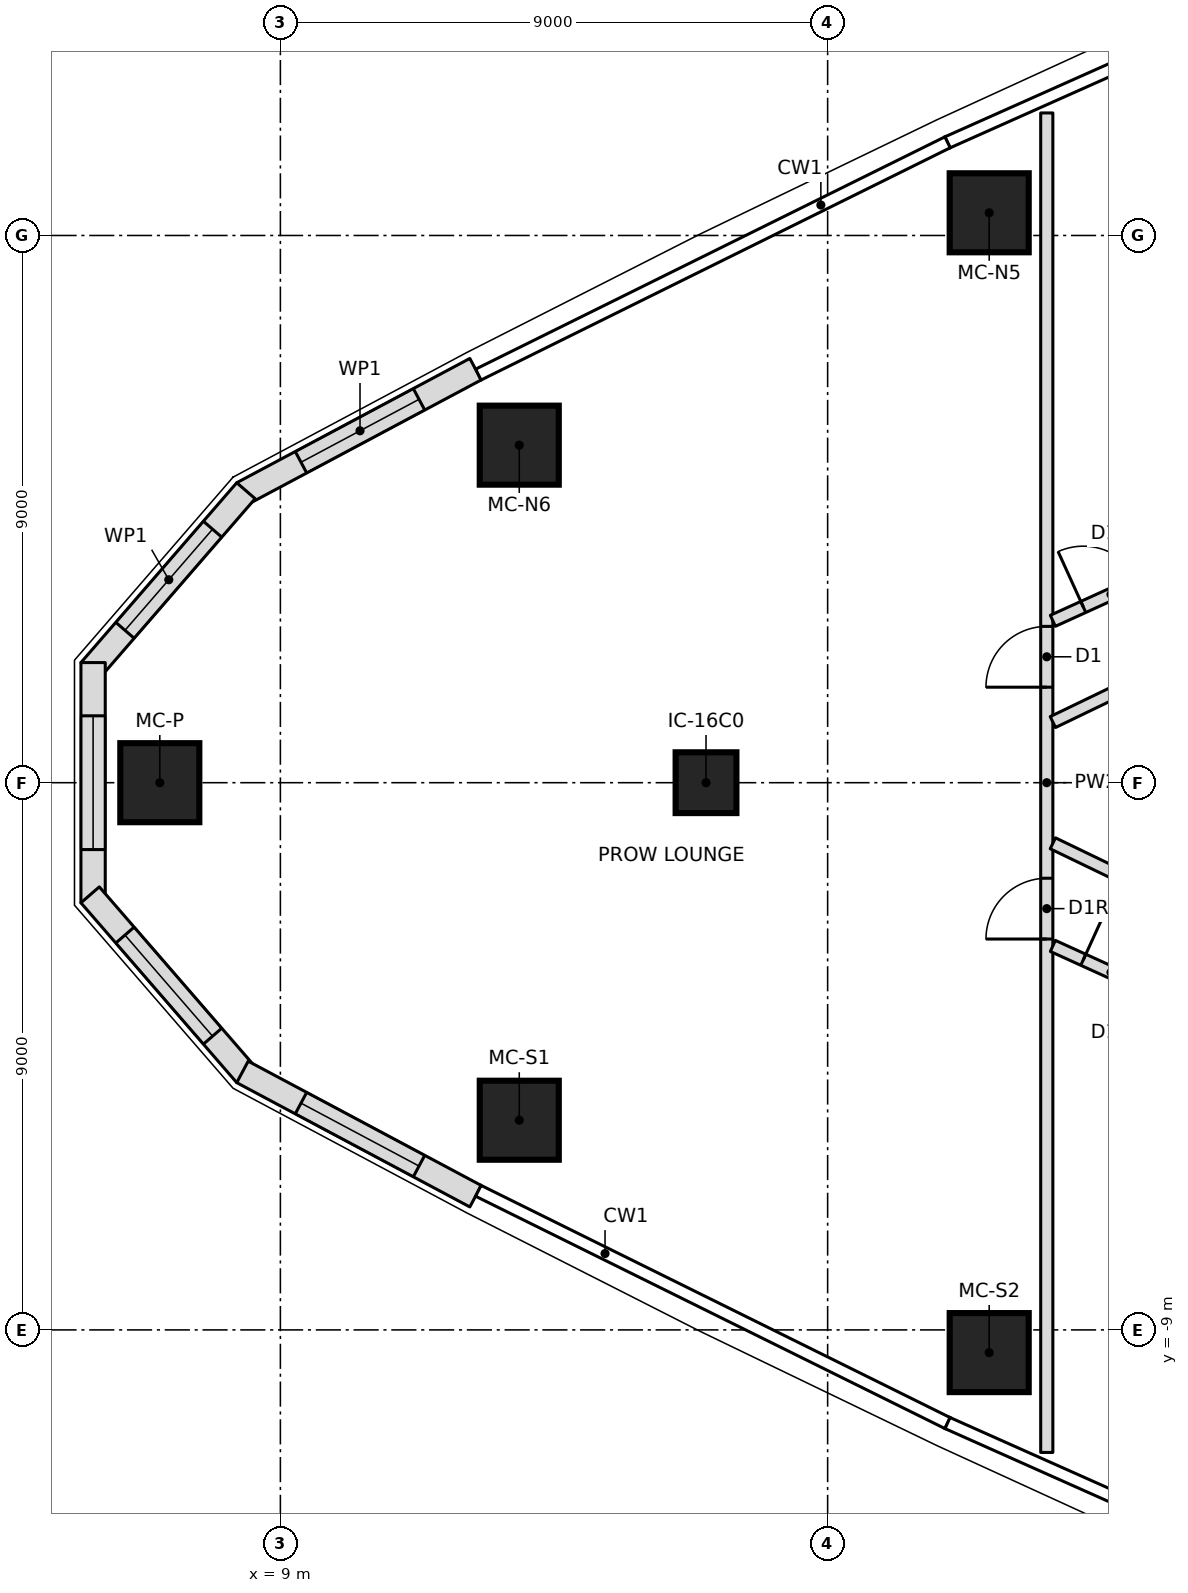
"""IFC4 building model, lengths in metres.
Left out: names, types, materials, properties, quantities, classifications, styles, units other than length and angle.
Written with IfcOpenShell. Run it as: python <this file> out.ifc"""

import sys

from ifc_helpers import new_model, si_unit, direction, frame, frame_2d, origin, origin_2d, place, context, subcontext, project, spatial, polyline, rectangle, outline, extrude, element, fill, save


model = new_model("IFC4")
c1 = context("Model", 3, precision=1e-05, world=origin(), true_north=direction((0.0, 1.0)))
c2 = subcontext(c1, "Body", "Model", "MODEL_VIEW")
j1 = project(units=[si_unit("LENGTHUNIT", "METRE"), si_unit("PLANEANGLEUNIT", "RADIAN")], contexts=[c1])
p1 = place(None, origin())
s1 = spatial("IfcSite", under=j1, at=p1, CompositionType="ELEMENT")
p2 = place(p1, origin())
s2 = spatial("IfcBuilding", under=s1, at=p2, CompositionType="ELEMENT")
p3 = place(p2, frame((0.0, 0.0, 196.8)))
s3 = spatial("IfcBuildingStorey", under=s2, at=p3, CompositionType="ELEMENT", Elevation=196.8)
for number, where, z_axis, x_axis in (
    (1, (7.017, 0.0, 0.0), (0.0, 0.0, 1.0), (1.0, 0.0, 0.0)),
    (2, (12.929, -5.552, 0.0), (0.0, 0.0, 1.0), (1.0, 0.0, 0.0)),
    (3, (20.657, -9.373, 0.0), (0.0, 0.0, 1.0), (1.0, 0.0, 0.0)),
    (4, (20.657, 9.373, 0.0), (0.0, 0.0, 1.0), (1.0, 0.0, 0.0)),
    (5, (12.929, 5.552, 0.0), (0.0, 0.0, 1.0), (1.0, 0.0, 0.0)),
):
    element("IfcColumn", number, at=place(p3, frame(where, z_axis=z_axis, x_axis=x_axis)), inside=s3, PredefinedType="COLUMN", context=c2, shape_type="SweptSolid", body=[
        extrude(rectangle(XDim=1.3, YDim=1.3, at=origin_2d()), origin(), (0.0, 0.0, 1.0), 3.55),
    ])
p4 = place(p3, frame((16.0, 0.0, 0.0), z_axis=(0.0, 0.0, 1.0), x_axis=(1.0, 0.0, 0.0)))
e6 = element("IfcColumn", 6, at=p4, inside=s3, PredefinedType="COLUMN", context=c2, shape_type="SweptSolid", body=[
    extrude(rectangle(XDim=1.0, YDim=1.0, at=origin_2d()), origin(), (0.0, 0.0, 1.0), 3.55),
])
p5 = place(p3, frame((12.21, 6.801, 0.0), z_axis=(0.0, 0.0, 1.0), x_axis=(-0.882385889746, -0.470526451518, 0.0)))
e7 = element("IfcWall", 7, at=p5, inside=s3, PredefinedType="NOTDEFINED", context=c2, shape_type="SweptSolid", body=[
    extrude(outline(polyline([(0.0, -0.2), (4.344, -0.2), (4.27, 0.2), (0.0, 0.2), (0.0, -0.2)])), origin(), (0.0, 0.0, 1.0), 3.25),
])
p6 = place(p5, frame((1.053, 0.0, 0.6)))
e8 = element("IfcOpeningElement", 8, at=p6, cuts=e7, PredefinedType="OPENING", context=c2, shape_type="SweptSolid", body=[
    extrude(outline(polyline([(0.0, 1.35), (0.084, 1.771), (0.322, 2.128), (0.679, 2.366), (1.1, 2.45), (1.521, 2.366), (1.878, 2.128), (2.116, 1.771), (2.2, 1.35), (2.2, 1.1), (2.116, 0.679), (1.878, 0.322), (1.521, 0.084), (1.1, 0.0), (0.679, 0.084), (0.322, 0.322), (0.084, 0.679), (0.0, 1.1), (0.0, 1.35)])), frame((0.0, 0.21, 0.0), z_axis=(0.0, -1.0, 0.0), x_axis=(1.0, 0.0, 0.0)), (0.0, 0.0, 1.0), 0.42),
])
p7 = place(p3, frame((8.409, 4.774, 0.0), z_axis=(0.0, 0.0, 1.0), x_axis=(-0.654759384203, -0.755837382509, 0.0)))
e9 = element("IfcWall", 9, at=p7, inside=s3, PredefinedType="NOTDEFINED", context=c2, shape_type="SweptSolid", body=[
    extrude(outline(polyline([(-0.037, -0.2), (3.876, -0.2), (3.727, 0.2), (0.037, 0.2), (-0.037, -0.2)])), origin(), (0.0, 0.0, 1.0), 3.25),
])
p8 = place(p7, frame((0.801, 0.0, 0.6)))
e10 = element("IfcOpeningElement", 10, at=p8, cuts=e9, PredefinedType="OPENING", context=c2, shape_type="SweptSolid", body=[
    extrude(outline(polyline([(0.0, 1.35), (0.084, 1.771), (0.322, 2.128), (0.679, 2.366), (1.1, 2.45), (1.521, 2.366), (1.878, 2.128), (2.116, 1.771), (2.2, 1.35), (2.2, 1.1), (2.116, 0.679), (1.878, 0.322), (1.521, 0.084), (1.1, 0.0), (0.679, 0.084), (0.322, 0.322), (0.084, 0.679), (0.0, 1.1), (0.0, 1.35)])), frame((0.0, 0.21, 0.0), z_axis=(0.0, -1.0, 0.0), x_axis=(1.0, 0.0, 0.0)), (0.0, 0.0, 1.0), 0.42),
])
p9 = place(p3, frame((5.92, 1.901, 0.0), z_axis=(0.0, 0.0, 1.0), x_axis=(0.0, -1.0, 0.0)))
e11 = element("IfcWall", 11, at=p9, inside=s3, PredefinedType="NOTDEFINED", context=c2, shape_type="SweptSolid", body=[
    extrude(outline(polyline([(-0.075, -0.2), (3.876, -0.2), (3.727, 0.2), (0.075, 0.2), (-0.075, -0.2)])), origin(), (0.0, 0.0, 1.0), 3.25),
])
p10 = place(p9, frame((0.801, 0.0, 0.6)))
e12 = element("IfcOpeningElement", 12, at=p10, cuts=e11, PredefinedType="OPENING", context=c2, shape_type="SweptSolid", body=[
    extrude(outline(polyline([(0.0, 1.35), (0.084, 1.771), (0.322, 2.128), (0.679, 2.366), (1.1, 2.45), (1.521, 2.366), (1.878, 2.128), (2.116, 1.771), (2.2, 1.35), (2.2, 1.1), (2.116, 0.679), (1.878, 0.322), (1.521, 0.084), (1.1, 0.0), (0.679, 0.084), (0.322, 0.322), (0.084, 0.679), (0.0, 1.1), (0.0, 1.35)])), frame((0.0, 0.21, 0.0), z_axis=(0.0, -1.0, 0.0), x_axis=(1.0, 0.0, 0.0)), (0.0, 0.0, 1.0), 0.42),
])
p11 = place(p3, frame((5.92, -1.901, 0.0), z_axis=(0.0, 0.0, 1.0), x_axis=(0.654759384203, -0.755837382509, 0.0)))
e13 = element("IfcWall", 13, at=p11, inside=s3, PredefinedType="NOTDEFINED", context=c2, shape_type="SweptSolid", body=[
    extrude(outline(polyline([(-0.075, -0.2), (3.839, -0.2), (3.765, 0.2), (0.075, 0.2), (-0.075, -0.2)])), origin(), (0.0, 0.0, 1.0), 3.25),
])
p12 = place(p11, frame((0.801, 0.0, 0.6)))
e14 = element("IfcOpeningElement", 14, at=p12, cuts=e13, PredefinedType="OPENING", context=c2, shape_type="SweptSolid", body=[
    extrude(outline(polyline([(0.0, 1.35), (0.084, 1.771), (0.322, 2.128), (0.679, 2.366), (1.1, 2.45), (1.521, 2.366), (1.878, 2.128), (2.116, 1.771), (2.2, 1.35), (2.2, 1.1), (2.116, 0.679), (1.878, 0.322), (1.521, 0.084), (1.1, 0.0), (0.679, 0.084), (0.322, 0.322), (0.084, 0.679), (0.0, 1.1), (0.0, 1.35)])), frame((0.0, 0.21, 0.0), z_axis=(0.0, -1.0, 0.0), x_axis=(1.0, 0.0, 0.0)), (0.0, 0.0, 1.0), 0.42),
])
p13 = place(p3, frame((8.409, -4.774, 0.0), z_axis=(0.0, 0.0, 1.0), x_axis=(0.882385889746, -0.470526451518, 0.0)))
e15 = element("IfcWall", 15, at=p13, inside=s3, PredefinedType="NOTDEFINED", context=c2, shape_type="SweptSolid", body=[
    extrude(outline(polyline([(-0.037, -0.2), (4.307, -0.2), (4.307, 0.2), (0.037, 0.2), (-0.037, -0.2)])), origin(), (0.0, 0.0, 1.0), 3.25),
])
p14 = place(p13, frame((1.053, 0.0, 0.6)))
e16 = element("IfcOpeningElement", 16, at=p14, cuts=e15, PredefinedType="OPENING", context=c2, shape_type="SweptSolid", body=[
    extrude(outline(polyline([(0.0, 1.35), (0.084, 1.771), (0.322, 2.128), (0.679, 2.366), (1.1, 2.45), (1.521, 2.366), (1.878, 2.128), (2.116, 1.771), (2.2, 1.35), (2.2, 1.1), (2.116, 0.679), (1.878, 0.322), (1.521, 0.084), (1.1, 0.0), (0.679, 0.084), (0.322, 0.322), (0.084, 0.679), (0.0, 1.1), (0.0, 1.35)])), frame((0.0, 0.21, 0.0), z_axis=(0.0, -1.0, 0.0), x_axis=(1.0, 0.0, 0.0)), (0.0, 0.0, 1.0), 0.42),
])
p15 = place(p3, frame((21.604, -11.015, 0.0), z_axis=(0.0, 0.0, 1.0), x_axis=(0.0, 1.0, 0.0)))
e17 = element("IfcWall", 17, at=p15, inside=s3, PredefinedType="PARTITIONING", context=c2, shape_type="SweptSolid", body=[
    extrude(rectangle(XDim=22.031, YDim=0.2, at=frame_2d((11.015, 0.0))), origin(), (0.0, 0.0, 1.0), 3.25),
])
p16 = place(p15, frame((12.586, 0.0, 0.0)))
e18 = element("IfcOpeningElement", 18, at=p16, cuts=e17, PredefinedType="OPENING", context=c2, shape_type="SweptSolid", body=[
    extrude(rectangle(XDim=1.0, YDim=2.1, at=frame_2d((0.5, 1.05))), frame((0.0, 0.11, 0.0), z_axis=(0.0, -1.0, 0.0), x_axis=(1.0, 0.0, 0.0)), (0.0, 0.0, 1.0), 0.22),
])
p17 = place(p15, frame((8.444, 0.0, 0.0)))
e19 = element("IfcOpeningElement", 19, at=p17, cuts=e17, PredefinedType="OPENING", context=c2, shape_type="SweptSolid", body=[
    extrude(rectangle(XDim=1.0, YDim=2.1, at=frame_2d((0.5, 1.05))), frame((0.0, 0.11, 0.0), z_axis=(0.0, -1.0, 0.0), x_axis=(1.0, 0.0, 0.0)), (0.0, 0.0, 1.0), 0.22),
])
p18 = place(p3, frame((21.704, 2.663, 0.0), z_axis=(0.0, 0.0, 1.0), x_axis=(0.910233539732, 0.414095282692, 0.0)))
e20 = element("IfcWall", 20, at=p18, inside=s3, PredefinedType="PARTITIONING", context=c2, shape_type="SweptSolid", body=[
    extrude(rectangle(XDim=8.808, YDim=0.2, at=frame_2d((4.404, 0.0))), origin(), (0.0, 0.0, 1.0), 3.25),
])
p19 = place(p18, frame((0.55, 0.0, 0.0)))
e21 = element("IfcOpeningElement", 21, at=p19, cuts=e20, PredefinedType="OPENING", context=c2, shape_type="SweptSolid", body=[
    extrude(rectangle(XDim=1.0, YDim=2.1, at=frame_2d((0.5, 1.05))), frame((0.0, 0.11, 0.0), z_axis=(0.0, -1.0, 0.0), x_axis=(1.0, 0.0, 0.0)), (0.0, 0.0, 1.0), 0.22),
])
p20 = place(p3, frame((21.704, -2.685, 0.0), z_axis=(0.0, 0.0, 1.0), x_axis=(0.910242920453, -0.414074662067, 0.0)))
e22 = element("IfcWall", 22, at=p20, inside=s3, PredefinedType="PARTITIONING", context=c2, shape_type="SweptSolid", body=[
    extrude(rectangle(XDim=8.8, YDim=0.2, at=frame_2d((4.4, 0.0))), origin(), (0.0, 0.0, 1.0), 3.25),
])
p21 = place(p20, frame((0.55, 0.0, 0.0)))
e23 = element("IfcOpeningElement", 23, at=p21, cuts=e22, PredefinedType="OPENING", context=c2, shape_type="SweptSolid", body=[
    extrude(rectangle(XDim=1.0, YDim=2.1, at=frame_2d((0.5, 1.05))), frame((0.0, 0.11, 0.0), z_axis=(0.0, -1.0, 0.0), x_axis=(1.0, 0.0, 0.0)), (0.0, 0.0, 1.0), 0.22),
])
for number, where, z_axis, x_axis in (
    (24, (23.947, -2.079, 0.0), (0.0, 0.0, 1.0), (-0.901, 0.435, 0.0)),
    (25, (21.704, 0.997, 0.0), (0.0, 0.0, 1.0), (0.901, 0.435, 0.0)),
):
    element("IfcWall", number, at=place(p3, frame(where, z_axis=z_axis, x_axis=x_axis)), inside=s3, PredefinedType="PARTITIONING", context=c2, shape_type="SweptSolid", body=[
        extrude(rectangle(XDim=2.49, YDim=0.2, at=frame_2d((1.245, 0.0))), origin(), (0.0, 0.0, 1.0), 3.25),
    ])
p22 = place(p6, origin())
e26 = element("IfcWindow", 26, at=p22, inside=s3, PartitioningType="SINGLE_PANEL", PredefinedType="WINDOW", context=c2, shape_type="SweptSolid", body=[
    extrude(outline(polyline([(0.0, 1.35), (0.084, 1.771), (0.322, 2.128), (0.679, 2.366), (1.1, 2.45), (1.521, 2.366), (1.878, 2.128), (2.116, 1.771), (2.2, 1.35), (2.2, 1.1), (2.116, 0.679), (1.878, 0.322), (1.521, 0.084), (1.1, 0.0), (0.679, 0.084), (0.322, 0.322), (0.084, 0.679), (0.0, 1.1), (0.0, 1.35)])), frame((0.0, 0.17, 0.0), z_axis=(0.0, -1.0, 0.0), x_axis=(1.0, 0.0, 0.0)), (0.0, 0.0, 1.0), 0.06),
])
fill(e8, e26)
p23 = place(p8, origin())
e27 = element("IfcWindow", 27, at=p23, inside=s3, PartitioningType="SINGLE_PANEL", PredefinedType="WINDOW", context=c2, shape_type="SweptSolid", body=[
    extrude(outline(polyline([(0.0, 1.35), (0.084, 1.771), (0.322, 2.128), (0.679, 2.366), (1.1, 2.45), (1.521, 2.366), (1.878, 2.128), (2.116, 1.771), (2.2, 1.35), (2.2, 1.1), (2.116, 0.679), (1.878, 0.322), (1.521, 0.084), (1.1, 0.0), (0.679, 0.084), (0.322, 0.322), (0.084, 0.679), (0.0, 1.1), (0.0, 1.35)])), frame((0.0, 0.17, 0.0), z_axis=(0.0, -1.0, 0.0), x_axis=(1.0, 0.0, 0.0)), (0.0, 0.0, 1.0), 0.06),
])
fill(e10, e27)
p24 = place(p10, origin())
e28 = element("IfcWindow", 28, at=p24, inside=s3, PartitioningType="SINGLE_PANEL", PredefinedType="WINDOW", context=c2, shape_type="SweptSolid", body=[
    extrude(outline(polyline([(0.0, 1.35), (0.084, 1.771), (0.322, 2.128), (0.679, 2.366), (1.1, 2.45), (1.521, 2.366), (1.878, 2.128), (2.116, 1.771), (2.2, 1.35), (2.2, 1.1), (2.116, 0.679), (1.878, 0.322), (1.521, 0.084), (1.1, 0.0), (0.679, 0.084), (0.322, 0.322), (0.084, 0.679), (0.0, 1.1), (0.0, 1.35)])), frame((0.0, 0.17, 0.0), z_axis=(0.0, -1.0, 0.0), x_axis=(1.0, 0.0, 0.0)), (0.0, 0.0, 1.0), 0.06),
])
fill(e12, e28)
p25 = place(p12, origin())
e29 = element("IfcWindow", 29, at=p25, inside=s3, PartitioningType="SINGLE_PANEL", PredefinedType="WINDOW", context=c2, shape_type="SweptSolid", body=[
    extrude(outline(polyline([(0.0, 1.35), (0.084, 1.771), (0.322, 2.128), (0.679, 2.366), (1.1, 2.45), (1.521, 2.366), (1.878, 2.128), (2.116, 1.771), (2.2, 1.35), (2.2, 1.1), (2.116, 0.679), (1.878, 0.322), (1.521, 0.084), (1.1, 0.0), (0.679, 0.084), (0.322, 0.322), (0.084, 0.679), (0.0, 1.1), (0.0, 1.35)])), frame((0.0, 0.17, 0.0), z_axis=(0.0, -1.0, 0.0), x_axis=(1.0, 0.0, 0.0)), (0.0, 0.0, 1.0), 0.06),
])
fill(e14, e29)
p26 = place(p14, origin())
e30 = element("IfcWindow", 30, at=p26, inside=s3, PartitioningType="SINGLE_PANEL", PredefinedType="WINDOW", context=c2, shape_type="SweptSolid", body=[
    extrude(outline(polyline([(0.0, 1.35), (0.084, 1.771), (0.322, 2.128), (0.679, 2.366), (1.1, 2.45), (1.521, 2.366), (1.878, 2.128), (2.116, 1.771), (2.2, 1.35), (2.2, 1.1), (2.116, 0.679), (1.878, 0.322), (1.521, 0.084), (1.1, 0.0), (0.679, 0.084), (0.322, 0.322), (0.084, 0.679), (0.0, 1.1), (0.0, 1.35)])), frame((0.0, 0.17, 0.0), z_axis=(0.0, -1.0, 0.0), x_axis=(1.0, 0.0, 0.0)), (0.0, 0.0, 1.0), 0.06),
])
fill(e16, e30)
p27 = place(p16, origin())
e31 = element("IfcDoor", 31, at=p27, inside=s3, OperationType="SINGLE_SWING_LEFT", PredefinedType="DOOR", context=c2, shape_type="SweptSolid", body=[
    extrude(rectangle(XDim=1.0, YDim=2.1, at=frame_2d((0.5, 1.05))), frame((0.0, 0.025, 0.0), z_axis=(0.0, -1.0, 0.0), x_axis=(1.0, 0.0, 0.0)), (0.0, 0.0, 1.0), 0.05),
])
fill(e18, e31)
p28 = place(p17, origin())
e32 = element("IfcDoor", 32, at=p28, inside=s3, OperationType="SINGLE_SWING_RIGHT", PredefinedType="DOOR", context=c2, shape_type="SweptSolid", body=[
    extrude(rectangle(XDim=1.0, YDim=2.1, at=frame_2d((0.5, 1.05))), frame((0.0, 0.025, 0.0), z_axis=(0.0, -1.0, 0.0), x_axis=(1.0, 0.0, 0.0)), (0.0, 0.0, 1.0), 0.05),
])
fill(e19, e32)
p29 = place(p19, origin())
e33 = element("IfcDoor", 33, at=p29, inside=s3, OperationType="SINGLE_SWING_RIGHT", PredefinedType="DOOR", context=c2, shape_type="SweptSolid", body=[
    extrude(rectangle(XDim=1.0, YDim=2.1, at=frame_2d((0.5, 1.05))), frame((0.0, 0.025, 0.0), z_axis=(0.0, -1.0, 0.0), x_axis=(1.0, 0.0, 0.0)), (0.0, 0.0, 1.0), 0.05),
])
fill(e21, e33)
p30 = place(p21, origin())
e34 = element("IfcDoor", 34, at=p30, inside=s3, OperationType="SINGLE_SWING_RIGHT", PredefinedType="DOOR", context=c2, shape_type="SweptSolid", body=[
    extrude(rectangle(XDim=1.0, YDim=2.1, at=frame_2d((0.5, 1.05))), frame((0.0, 0.025, 0.0), z_axis=(0.0, -1.0, 0.0), x_axis=(1.0, 0.0, 0.0)), (0.0, 0.0, 1.0), 0.05),
])
fill(e23, e34)
save(model, sys.argv[1])
